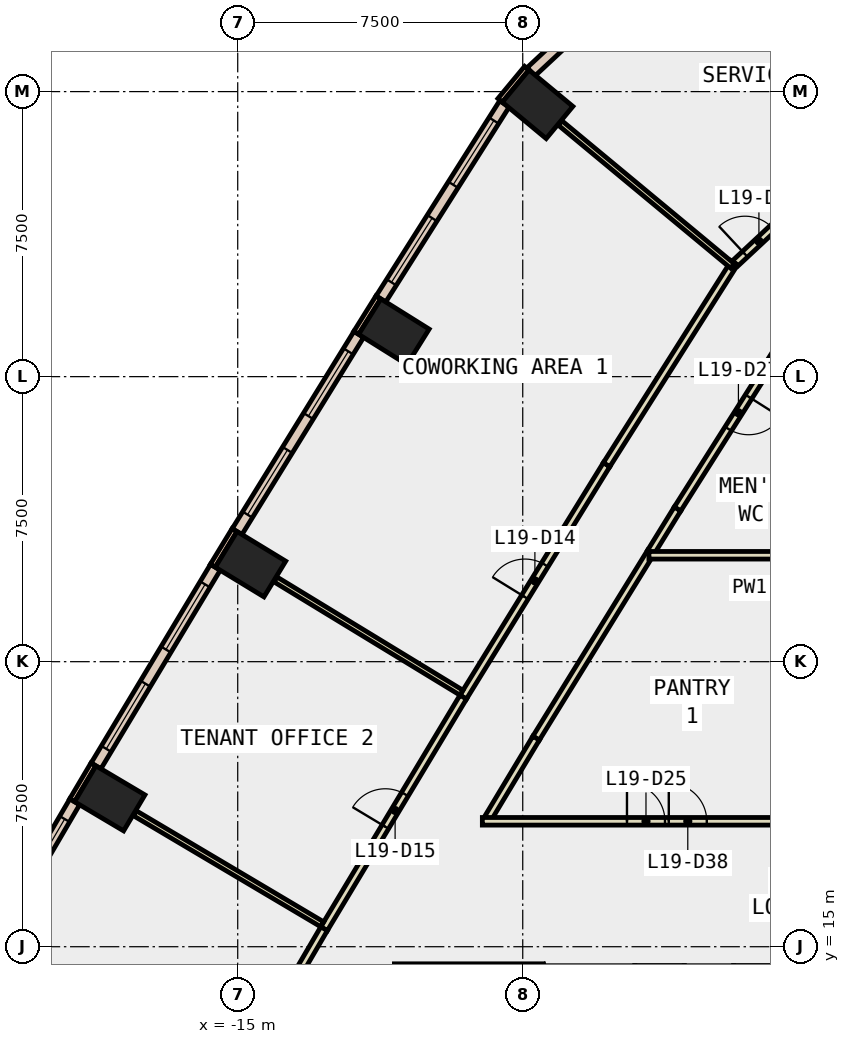
"""IFC4 building model, lengths in metres.
Left out: names, types, materials, properties, quantities, classifications, styles, units other than length and angle.
Written with IfcOpenShell. Run it as: python <this file> out.ifc"""

import sys

from ifc_helpers import new_model, si_unit, direction, frame, frame_2d, origin, origin_2d, place, context, subcontext, project, spatial, rectangle, extrude, element, fill, save


model = new_model("IFC4")
c1 = context("Model", 3, precision=1e-05, world=origin(), true_north=direction((0.0, 1.0)))
c2 = subcontext(c1, "Body", "Model", "MODEL_VIEW")
j1 = project(units=[si_unit("LENGTHUNIT", "METRE"), si_unit("PLANEANGLEUNIT", "RADIAN")], contexts=[c1])
p1 = place(None, origin())
s1 = spatial("IfcSite", under=j1, at=p1, CompositionType="ELEMENT")
p2 = place(p1, origin())
s2 = spatial("IfcBuilding", under=s1, at=p2, CompositionType="ELEMENT")
p3 = place(p2, frame((0.0, 0.0, 90.8)))
s3 = spatial("IfcBuildingStorey", under=s2, at=p3, CompositionType="ELEMENT", Elevation=90.8)
for number, where, z_axis, x_axis in (
    (1, (-7.109, 37.166, -0.4), (0.0, 0.0, 1.0), (0.638, 0.77, 0.0)),
    (2, (-10.89, 31.182, -0.4), (0.0, 0.0, 1.0), (0.53, 0.848, 0.0)),
    (3, (-14.664, 25.065, -0.4), (0.0, 0.0, 1.0), (0.52, 0.854, 0.0)),
    (4, (-18.367, 18.904, -0.4), (0.0, 0.0, 1.0), (0.51, 0.86, 0.0)),
):
    element("IfcColumn", number, at=place(p3, frame(where, z_axis=z_axis, x_axis=x_axis)), inside=s3, PredefinedType="COLUMN", context=c2, shape_type="SweptSolid", body=[
        extrude(rectangle(XDim=1.1, YDim=1.5, at=origin_2d()), origin(), (0.0, 0.0, 1.0), 4.2),
    ])
p4 = place(p3, frame((-7.393, 38.116, 0.0), z_axis=(0.0, 0.0, 1.0), x_axis=(-0.638544483078, -0.769584916127, 0.0)))
e5 = element("IfcWall", 5, at=p4, inside=s3, PredefinedType="STANDARD", context=c2, shape_type="SweptSolid", body=[
    extrude(rectangle(XDim=1.099, YDim=0.15, at=frame_2d((0.55, 0.0))), origin(), (0.0, 0.0, 1.0), 3.8),
])
p5 = place(p3, frame((-11.298, 32.086, 0.0), z_axis=(0.0, 0.0, 1.0), x_axis=(-0.52997899071, -0.848010771987, 0.0)))
e6 = element("IfcWall", 6, at=p5, inside=s3, PredefinedType="STANDARD", context=c2, shape_type="SweptSolid", body=[
    extrude(rectangle(XDim=1.1, YDim=0.15, at=frame_2d((0.55, 0.0))), origin(), (0.0, 0.0, 1.0), 3.8),
])
p6 = place(p3, frame((-15.083, 25.964, 0.0), z_axis=(0.0, 0.0, 1.0), x_axis=(-0.51977099384, -0.854305632641, 0.0)))
e7 = element("IfcWall", 7, at=p6, inside=s3, PredefinedType="STANDARD", context=c2, shape_type="SweptSolid", body=[
    extrude(rectangle(XDim=1.101, YDim=0.15, at=frame_2d((0.55, 0.0))), origin(), (0.0, 0.0, 1.0), 3.8),
])
p7 = place(p3, frame((-18.796, 19.798, 0.0), z_axis=(0.0, 0.0, 1.0), x_axis=(-0.510082245696, -0.860125631885, 0.0)))
e8 = element("IfcWall", 8, at=p7, inside=s3, PredefinedType="STANDARD", context=c2, shape_type="SweptSolid", body=[
    extrude(rectangle(XDim=1.1, YDim=0.15, at=frame_2d((0.55, 0.0))), origin(), (0.0, 0.0, 1.0), 3.8),
])
p8 = place(p3, frame((-4.786, 40.347, 0.0), z_axis=(0.0, 0.0, 1.0), x_axis=(-0.731614451791, -0.681718632525, 0.0)))
e9 = element("IfcWall", 9, at=p8, inside=s3, PredefinedType="STANDARD", context=c2, shape_type="SweptSolid", body=[
    extrude(rectangle(XDim=3.41, YDim=0.3, at=frame_2d((1.705, 0.0))), origin(), (0.0, 0.0, 1.0), 3.8),
])
p9 = place(p8, frame((1.005, 0.0, 0.9)))
e10 = element("IfcOpeningElement", 10, at=p9, cuts=e9, PredefinedType="OPENING", context=c2, shape_type="SweptSolid", body=[
    extrude(rectangle(XDim=1.4, YDim=2.6, at=frame_2d((0.7, 1.3))), frame((0.0, 0.16, 0.0), z_axis=(0.0, -1.0, 0.0), x_axis=(1.0, 0.0, 0.0)), (0.0, 0.0, 1.0), 0.32),
])
p10 = place(p3, frame((-7.982, 37.177, 0.0), z_axis=(0.0, 0.0, 1.0), x_axis=(-0.534869492536, -0.84493468739, 0.0)))
e11 = element("IfcWall", 11, at=p10, inside=s3, PredefinedType="STANDARD", context=c2, shape_type="SweptSolid", body=[
    extrude(rectangle(XDim=6.076, YDim=0.3, at=frame_2d((3.038, 0.0))), origin(), (0.0, 0.0, 1.0), 3.8),
])
p11 = place(p10, frame((0.519, 0.0, 0.9)))
e12 = element("IfcOpeningElement", 12, at=p11, cuts=e11, PredefinedType="OPENING", context=c2, shape_type="SweptSolid", body=[
    extrude(rectangle(XDim=2.0, YDim=2.6, at=frame_2d((1.0, 1.3))), frame((0.0, 0.16, 0.0), z_axis=(0.0, -1.0, 0.0), x_axis=(1.0, 0.0, 0.0)), (0.0, 0.0, 1.0), 0.32),
])
p12 = place(p10, frame((3.557, 0.0, 0.9)))
e13 = element("IfcOpeningElement", 13, at=p12, cuts=e11, PredefinedType="OPENING", context=c2, shape_type="SweptSolid", body=[
    extrude(rectangle(XDim=2.0, YDim=2.6, at=frame_2d((1.0, 1.3))), frame((0.0, 0.16, 0.0), z_axis=(0.0, -1.0, 0.0), x_axis=(1.0, 0.0, 0.0)), (0.0, 0.0, 1.0), 0.32),
])
p13 = place(p3, frame((-11.814, 31.112, 0.0), z_axis=(0.0, 0.0, 1.0), x_axis=(-0.525204788886, -0.850975869065, 0.0)))
e14 = element("IfcWall", 14, at=p13, inside=s3, PredefinedType="STANDARD", context=c2, shape_type="SweptSolid", body=[
    extrude(rectangle(XDim=6.099, YDim=0.3, at=frame_2d((3.049, 0.0))), origin(), (0.0, 0.0, 1.0), 3.8),
])
p14 = place(p13, frame((0.525, 0.0, 0.9)))
e15 = element("IfcOpeningElement", 15, at=p14, cuts=e14, PredefinedType="OPENING", context=c2, shape_type="SweptSolid", body=[
    extrude(rectangle(XDim=2.0, YDim=2.6, at=frame_2d((1.0, 1.3))), frame((0.0, 0.16, 0.0), z_axis=(0.0, -1.0, 0.0), x_axis=(1.0, 0.0, 0.0)), (0.0, 0.0, 1.0), 0.32),
])
p15 = place(p13, frame((3.574, 0.0, 0.9)))
e16 = element("IfcOpeningElement", 16, at=p15, cuts=e14, PredefinedType="OPENING", context=c2, shape_type="SweptSolid", body=[
    extrude(rectangle(XDim=2.0, YDim=2.6, at=frame_2d((1.0, 1.3))), frame((0.0, 0.16, 0.0), z_axis=(0.0, -1.0, 0.0), x_axis=(1.0, 0.0, 0.0)), (0.0, 0.0, 1.0), 0.32),
])
p16 = place(p3, frame((-15.588, 24.984, 0.0), z_axis=(0.0, 0.0, 1.0), x_axis=(-0.515102053092, -0.857128855483, 0.0)))
e17 = element("IfcWall", 17, at=p16, inside=s3, PredefinedType="STANDARD", context=c2, shape_type="SweptSolid", body=[
    extrude(rectangle(XDim=6.098, YDim=0.3, at=frame_2d((3.049, 0.0))), origin(), (0.0, 0.0, 1.0), 3.8),
])
p17 = place(p16, frame((0.525, 0.0, 0.9)))
e18 = element("IfcOpeningElement", 18, at=p17, cuts=e17, PredefinedType="OPENING", context=c2, shape_type="SweptSolid", body=[
    extrude(rectangle(XDim=2.0, YDim=2.6, at=frame_2d((1.0, 1.3))), frame((0.0, 0.16, 0.0), z_axis=(0.0, -1.0, 0.0), x_axis=(1.0, 0.0, 0.0)), (0.0, 0.0, 1.0), 0.32),
])
p18 = place(p16, frame((3.574, 0.0, 0.9)))
e19 = element("IfcOpeningElement", 19, at=p18, cuts=e17, PredefinedType="OPENING", context=c2, shape_type="SweptSolid", body=[
    extrude(rectangle(XDim=2.0, YDim=2.6, at=frame_2d((1.0, 1.3))), frame((0.0, 0.16, 0.0), z_axis=(0.0, -1.0, 0.0), x_axis=(1.0, 0.0, 0.0)), (0.0, 0.0, 1.0), 0.32),
])
p19 = place(p3, frame((-19.289, 18.813, 0.0), z_axis=(0.0, 0.0, 1.0), x_axis=(-0.504998117261, -0.863120444413, 0.0)))
e20 = element("IfcWall", 20, at=p19, inside=s3, PredefinedType="STANDARD", context=c2, shape_type="SweptSolid", body=[
    extrude(rectangle(XDim=6.099, YDim=0.3, at=frame_2d((3.049, 0.0))), origin(), (0.0, 0.0, 1.0), 3.8),
])
p20 = place(p19, frame((0.525, 0.0, 0.9)))
e21 = element("IfcOpeningElement", 21, at=p20, cuts=e20, PredefinedType="OPENING", context=c2, shape_type="SweptSolid", body=[
    extrude(rectangle(XDim=2.0, YDim=2.6, at=frame_2d((1.0, 1.3))), frame((0.0, 0.16, 0.0), z_axis=(0.0, -1.0, 0.0), x_axis=(1.0, 0.0, 0.0)), (0.0, 0.0, 1.0), 0.32),
])
p21 = place(p19, frame((3.574, 0.0, 0.9)))
e22 = element("IfcOpeningElement", 22, at=p21, cuts=e20, PredefinedType="OPENING", context=c2, shape_type="SweptSolid", body=[
    extrude(rectangle(XDim=2.0, YDim=2.6, at=frame_2d((1.0, 1.3))), frame((0.0, 0.16, 0.0), z_axis=(0.0, -1.0, 0.0), x_axis=(1.0, 0.0, 0.0)), (0.0, 0.0, 1.0), 0.32),
])
p22 = place(p3, frame((-4.126, 25.385, 0.0), z_axis=(0.0, 0.0, 1.0), x_axis=(-0.525162244663, -0.851002125016, 0.0)))
e23 = element("IfcWall", 23, at=p22, inside=s3, PredefinedType="PARTITIONING", context=c2, shape_type="SweptSolid", body=[
    extrude(rectangle(XDim=5.754, YDim=0.2, at=frame_2d((2.877, 0.0))), origin(), (0.0, 0.0, 1.0), 3.8),
])
p23 = place(p3, frame((-7.148, 20.488, 0.0), z_axis=(0.0, 0.0, 1.0), x_axis=(-0.515008089027, -0.857185317325, 0.0)))
e24 = element("IfcWall", 24, at=p23, inside=s3, PredefinedType="PARTITIONING", context=c2, shape_type="SweptSolid", body=[
    extrude(rectangle(XDim=2.452, YDim=0.2, at=frame_2d((1.226, 0.0))), origin(), (0.0, 0.0, 1.0), 3.8),
])
p24 = place(p3, frame((-0.221, 31.581, 0.0), z_axis=(0.0, 0.0, 1.0), x_axis=(-0.535034639024, -0.844830122003, 0.0)))
e25 = element("IfcWall", 25, at=p24, inside=s3, PredefinedType="PARTITIONING", context=c2, shape_type="SweptSolid", body=[
    extrude(rectangle(XDim=5.994, YDim=0.2, at=frame_2d((2.997, 0.0))), origin(), (0.0, 0.0, 1.0), 3.8),
])
p25 = place(p24, frame((2.497, 0.0, 0.0)))
e26 = element("IfcOpeningElement", 26, at=p25, cuts=e25, PredefinedType="OPENING", context=c2, shape_type="SweptSolid", body=[
    extrude(rectangle(XDim=1.0, YDim=2.1, at=frame_2d((0.5, 1.05))), frame((0.0, 0.11, 0.0), z_axis=(0.0, -1.0, 0.0), x_axis=(1.0, 0.0, 0.0)), (0.0, 0.0, 1.0), 0.22),
])
p26 = place(p3, frame((-3.428, 26.517, 0.0), z_axis=(0.0, 0.0, 1.0), x_axis=(-0.524824420869, -0.851210507019, 0.0)))
e27 = element("IfcWall", 27, at=p26, inside=s3, PredefinedType="PARTITIONING", context=c2, shape_type="SweptSolid", body=[
    extrude(rectangle(XDim=1.33, YDim=0.2, at=frame_2d((0.665, 0.0))), origin(), (0.0, 0.0, 1.0), 3.8),
])
p27 = place(p3, frame((-1.909, 32.981, 0.0), z_axis=(0.0, 0.0, 1.0), x_axis=(0.731549606095, 0.681788217721, 0.0)))
e28 = element("IfcWall", 28, at=p27, inside=s3, PredefinedType="PARTITIONING", context=c2, shape_type="SweptSolid", body=[
    extrude(rectangle(XDim=1.707, YDim=0.2, at=frame_2d((0.854, 0.0))), origin(), (0.0, 0.0, 1.0), 3.8),
])
p28 = place(p27, frame((0.353, 0.0, 0.0)))
e29 = element("IfcOpeningElement", 29, at=p28, cuts=e28, PredefinedType="OPENING", context=c2, shape_type="SweptSolid", body=[
    extrude(rectangle(XDim=1.0, YDim=2.1, at=frame_2d((0.5, 1.05))), frame((0.0, 0.11, 0.0), z_axis=(0.0, -1.0, 0.0), x_axis=(1.0, 0.0, 0.0)), (0.0, 0.0, 1.0), 0.22),
])
p29 = place(p3, frame((-9.067, 21.568, 0.0), z_axis=(0.0, 0.0, 1.0), x_axis=(0.525131931126, 0.851020831068, 0.0)))
e30 = element("IfcWall", 30, at=p29, inside=s3, PredefinedType="PARTITIONING", context=c2, shape_type="SweptSolid", body=[
    extrude(rectangle(XDim=7.187, YDim=0.2, at=frame_2d((3.593, 0.0))), origin(), (0.0, 0.0, 1.0), 3.8),
])
p30 = place(p29, frame((3.093, 0.0, 0.0)))
e31 = element("IfcOpeningElement", 31, at=p30, cuts=e30, PredefinedType="OPENING", context=c2, shape_type="SweptSolid", body=[
    extrude(rectangle(XDim=1.0, YDim=2.1, at=frame_2d((0.5, 1.05))), frame((0.0, 0.11, 0.0), z_axis=(0.0, -1.0, 0.0), x_axis=(1.0, 0.0, 0.0)), (0.0, 0.0, 1.0), 0.22),
])
p31 = place(p3, frame((-5.293, 27.684, 0.0), z_axis=(0.0, 0.0, 1.0), x_axis=(0.534952324147, 0.844882246759, 0.0)))
e32 = element("IfcWall", 32, at=p31, inside=s3, PredefinedType="PARTITIONING", context=c2, shape_type="SweptSolid", body=[
    extrude(rectangle(XDim=6.288, YDim=0.2, at=frame_2d((3.144, 0.0))), origin(), (0.0, 0.0, 1.0), 3.8),
])
p32 = place(p3, frame((-12.728, 15.473, 0.0), z_axis=(0.0, 0.0, 1.0), x_axis=(0.515010673306, 0.857183764651, 0.0)))
e33 = element("IfcWall", 33, at=p32, inside=s3, PredefinedType="PARTITIONING", context=c2, shape_type="SweptSolid", body=[
    extrude(rectangle(XDim=7.111, YDim=0.2, at=frame_2d((3.555, 0.0))), origin(), (0.0, 0.0, 1.0), 3.8),
])
p33 = place(p32, frame((3.13, 0.0, 0.0)))
e34 = element("IfcOpeningElement", 34, at=p33, cuts=e33, PredefinedType="OPENING", context=c2, shape_type="SweptSolid", body=[
    extrude(rectangle(XDim=1.0, YDim=2.1, at=frame_2d((0.5, 1.05))), frame((0.0, 0.11, 0.0), z_axis=(0.0, -1.0, 0.0), x_axis=(1.0, 0.0, 0.0)), (0.0, 0.0, 1.0), 0.22),
])
p34 = place(p3, frame((-16.281, 9.4, 0.0), z_axis=(0.0, 0.0, 1.0), x_axis=(0.504973069247, 0.863135099121, 0.0)))
e35 = element("IfcWall", 35, at=p34, inside=s3, PredefinedType="PARTITIONING", context=c2, shape_type="SweptSolid", body=[
    extrude(rectangle(XDim=7.036, YDim=0.2, at=frame_2d((3.518, 0.0))), origin(), (0.0, 0.0, 1.0), 3.8),
])
p35 = place(p3, frame((-8.563, 18.3, 0.0), z_axis=(0.0, 0.0, 1.0), x_axis=(1.0, 0.0, 0.0)))
e36 = element("IfcWall", 36, at=p35, inside=s3, PredefinedType="PARTITIONING", context=c2, shape_type="SweptSolid", body=[
    extrude(rectangle(XDim=8.163, YDim=0.2, at=frame_2d((4.082, 0.0))), origin(), (0.0, 0.0, 1.0), 3.8),
])
p36 = place(p35, frame((3.806, 0.0, 0.0)))
e37 = element("IfcOpeningElement", 37, at=p36, cuts=e36, PredefinedType="OPENING", context=c2, shape_type="SweptSolid", body=[
    extrude(rectangle(XDim=1.0, YDim=2.1, at=frame_2d((0.5, 1.05))), frame((0.0, 0.11, 0.0), z_axis=(0.0, -1.0, 0.0), x_axis=(1.0, 0.0, 0.0)), (0.0, 0.0, 1.0), 0.22),
])
p37 = place(p35, frame((4.906, 0.0, 0.0)))
e38 = element("IfcOpeningElement", 38, at=p37, cuts=e36, PredefinedType="OPENING", context=c2, shape_type="SweptSolid", body=[
    extrude(rectangle(XDim=1.0, YDim=2.1, at=frame_2d((0.5, 1.05))), frame((0.0, 0.11, 0.0), z_axis=(0.0, -1.0, 0.0), x_axis=(1.0, 0.0, 0.0)), (0.0, 0.0, 1.0), 0.22),
])
p38 = place(p3, frame((-6.957, 14.45, 0.0), z_axis=(0.0, 0.0, 1.0), x_axis=(-1.0, 0.0, 0.0)))
e39 = element("IfcWall", 39, at=p38, inside=s3, PredefinedType="PARTITIONING", context=c2, shape_type="SweptSolid", body=[
    extrude(rectangle(XDim=3.92, YDim=0.2, at=frame_2d((1.96, 0.0))), origin(), (0.0, 0.0, 1.0), 3.8),
])
p39 = place(p3, frame((-4.179, 25.3, 0.0), z_axis=(0.0, 0.0, 1.0), x_axis=(1.0, 0.0, 0.0)))
e40 = element("IfcWall", 40, at=p39, inside=s3, PredefinedType="PARTITIONING", context=c2, shape_type="SweptSolid", body=[
    extrude(rectangle(XDim=4.079, YDim=0.2, at=frame_2d((2.04, 0.0))), origin(), (0.0, 0.0, 1.0), 3.8),
])
p40 = place(p3, frame((-1.982, 32.913, 0.0), z_axis=(0.0, 0.0, 1.0), x_axis=(-0.769679976891, 0.638429896835, 0.0)))
e41 = element("IfcWall", 41, at=p40, inside=s3, PredefinedType="PARTITIONING", context=c2, shape_type="SweptSolid", body=[
    extrude(rectangle(XDim=5.891, YDim=0.15, at=frame_2d((2.946, 0.0))), origin(), (0.0, 0.0, 1.0), 3.8),
])
p41 = place(p3, frame((-9.113, 21.684, 0.0), z_axis=(0.0, 0.0, 1.0), x_axis=(-0.854075097122, 0.520149717367, 0.0)))
e42 = element("IfcWall", 42, at=p41, inside=s3, PredefinedType="PARTITIONING", context=c2, shape_type="SweptSolid", body=[
    extrude(rectangle(XDim=5.729, YDim=0.15, at=frame_2d((2.865, 0.0))), origin(), (0.0, 0.0, 1.0), 3.8),
])
p42 = place(p3, frame((-12.776, 15.589, 0.0), z_axis=(0.0, 0.0, 1.0), x_axis=(-0.860225086153, 0.509914503768, 0.0)))
e43 = element("IfcWall", 43, at=p42, inside=s3, PredefinedType="PARTITIONING", context=c2, shape_type="SweptSolid", body=[
    extrude(rectangle(XDim=5.73, YDim=0.15, at=frame_2d((2.865, 0.0))), origin(), (0.0, 0.0, 1.0), 3.8),
])
p43 = place(p11, origin())
e44 = element("IfcWindow", 44, at=p43, inside=s3, PartitioningType="SINGLE_PANEL", PredefinedType="WINDOW", context=c2, shape_type="SweptSolid", body=[
    extrude(rectangle(XDim=2.0, YDim=2.6, at=frame_2d((1.0, 1.3))), frame((0.0, 0.03, 0.0), z_axis=(0.0, -1.0, 0.0), x_axis=(1.0, 0.0, 0.0)), (0.0, 0.0, 1.0), 0.06),
])
fill(e12, e44)
p44 = place(p12, origin())
e45 = element("IfcWindow", 45, at=p44, inside=s3, PartitioningType="SINGLE_PANEL", PredefinedType="WINDOW", context=c2, shape_type="SweptSolid", body=[
    extrude(rectangle(XDim=2.0, YDim=2.6, at=frame_2d((1.0, 1.3))), frame((0.0, 0.03, 0.0), z_axis=(0.0, -1.0, 0.0), x_axis=(1.0, 0.0, 0.0)), (0.0, 0.0, 1.0), 0.06),
])
fill(e13, e45)
p45 = place(p14, origin())
e46 = element("IfcWindow", 46, at=p45, inside=s3, PartitioningType="SINGLE_PANEL", PredefinedType="WINDOW", context=c2, shape_type="SweptSolid", body=[
    extrude(rectangle(XDim=2.0, YDim=2.6, at=frame_2d((1.0, 1.3))), frame((0.0, 0.03, 0.0), z_axis=(0.0, -1.0, 0.0), x_axis=(1.0, 0.0, 0.0)), (0.0, 0.0, 1.0), 0.06),
])
fill(e15, e46)
p46 = place(p15, origin())
e47 = element("IfcWindow", 47, at=p46, inside=s3, PartitioningType="SINGLE_PANEL", PredefinedType="WINDOW", context=c2, shape_type="SweptSolid", body=[
    extrude(rectangle(XDim=2.0, YDim=2.6, at=frame_2d((1.0, 1.3))), frame((0.0, 0.03, 0.0), z_axis=(0.0, -1.0, 0.0), x_axis=(1.0, 0.0, 0.0)), (0.0, 0.0, 1.0), 0.06),
])
fill(e16, e47)
p47 = place(p17, origin())
e48 = element("IfcWindow", 48, at=p47, inside=s3, PartitioningType="SINGLE_PANEL", PredefinedType="WINDOW", context=c2, shape_type="SweptSolid", body=[
    extrude(rectangle(XDim=2.0, YDim=2.6, at=frame_2d((1.0, 1.3))), frame((0.0, 0.03, 0.0), z_axis=(0.0, -1.0, 0.0), x_axis=(1.0, 0.0, 0.0)), (0.0, 0.0, 1.0), 0.06),
])
fill(e18, e48)
p48 = place(p18, origin())
e49 = element("IfcWindow", 49, at=p48, inside=s3, PartitioningType="SINGLE_PANEL", PredefinedType="WINDOW", context=c2, shape_type="SweptSolid", body=[
    extrude(rectangle(XDim=2.0, YDim=2.6, at=frame_2d((1.0, 1.3))), frame((0.0, 0.03, 0.0), z_axis=(0.0, -1.0, 0.0), x_axis=(1.0, 0.0, 0.0)), (0.0, 0.0, 1.0), 0.06),
])
fill(e19, e49)
p49 = place(p20, origin())
e50 = element("IfcWindow", 50, at=p49, inside=s3, PartitioningType="SINGLE_PANEL", PredefinedType="WINDOW", context=c2, shape_type="SweptSolid", body=[
    extrude(rectangle(XDim=2.0, YDim=2.6, at=frame_2d((1.0, 1.3))), frame((0.0, 0.03, 0.0), z_axis=(0.0, -1.0, 0.0), x_axis=(1.0, 0.0, 0.0)), (0.0, 0.0, 1.0), 0.06),
])
fill(e21, e50)
p50 = place(p28, origin())
e51 = element("IfcDoor", 51, at=p50, inside=s3, OperationType="SINGLE_SWING_RIGHT", PredefinedType="DOOR", context=c2, shape_type="SweptSolid", body=[
    extrude(rectangle(XDim=1.0, YDim=2.1, at=frame_2d((0.5, 1.05))), frame((0.0, 0.025, 0.0), z_axis=(0.0, -1.0, 0.0), x_axis=(1.0, 0.0, 0.0)), (0.0, 0.0, 1.0), 0.05),
])
fill(e29, e51)
p51 = place(p30, origin())
e52 = element("IfcDoor", 52, at=p51, inside=s3, OperationType="SINGLE_SWING_RIGHT", PredefinedType="DOOR", context=c2, shape_type="SweptSolid", body=[
    extrude(rectangle(XDim=1.0, YDim=2.1, at=frame_2d((0.5, 1.05))), frame((0.0, 0.025, 0.0), z_axis=(0.0, -1.0, 0.0), x_axis=(1.0, 0.0, 0.0)), (0.0, 0.0, 1.0), 0.05),
])
fill(e31, e52)
p52 = place(p33, origin())
e53 = element("IfcDoor", 53, at=p52, inside=s3, OperationType="SINGLE_SWING_LEFT", PredefinedType="DOOR", context=c2, shape_type="SweptSolid", body=[
    extrude(rectangle(XDim=1.0, YDim=2.1, at=frame_2d((0.5, 1.05))), frame((0.0, 0.025, 0.0), z_axis=(0.0, -1.0, 0.0), x_axis=(1.0, 0.0, 0.0)), (0.0, 0.0, 1.0), 0.05),
])
fill(e34, e53)
p53 = place(p36, origin())
e54 = element("IfcDoor", 54, at=p53, inside=s3, OperationType="SINGLE_SWING_RIGHT", PredefinedType="DOOR", context=c2, shape_type="SweptSolid", body=[
    extrude(rectangle(XDim=1.0, YDim=2.1, at=frame_2d((0.5, 1.05))), frame((0.0, 0.025, 0.0), z_axis=(0.0, -1.0, 0.0), x_axis=(1.0, 0.0, 0.0)), (0.0, 0.0, 1.0), 0.05),
])
fill(e37, e54)
p54 = place(p25, origin())
e55 = element("IfcDoor", 55, at=p54, inside=s3, OperationType="SINGLE_SWING_LEFT", PredefinedType="DOOR", context=c2, shape_type="SweptSolid", body=[
    extrude(rectangle(XDim=1.0, YDim=2.1, at=frame_2d((0.5, 1.05))), frame((0.0, 0.025, 0.0), z_axis=(0.0, -1.0, 0.0), x_axis=(1.0, 0.0, 0.0)), (0.0, 0.0, 1.0), 0.05),
])
fill(e26, e55)
p55 = place(p37, origin())
e56 = element("IfcDoor", 56, at=p55, inside=s3, OperationType="SINGLE_SWING_RIGHT", PredefinedType="DOOR", context=c2, shape_type="SweptSolid", body=[
    extrude(rectangle(XDim=1.0, YDim=2.1, at=frame_2d((0.5, 1.05))), frame((0.0, 0.025, 0.0), z_axis=(0.0, -1.0, 0.0), x_axis=(1.0, 0.0, 0.0)), (0.0, 0.0, 1.0), 0.05),
])
fill(e38, e56)
save(model, sys.argv[1])
